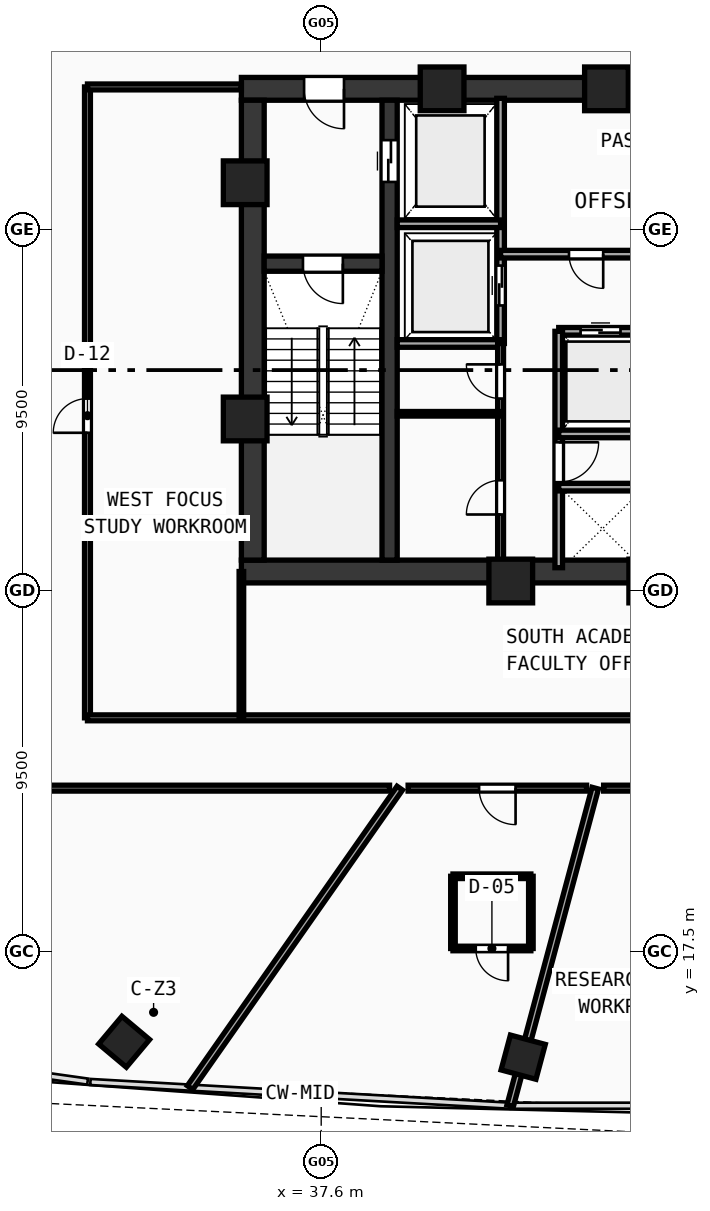
"""IFC4 building model, lengths in metres.
Left out: names, types, materials, properties, quantities, classifications, styles, units other than length and angle.
Written with IfcOpenShell. Run it as: python <this file> out.ifc"""

import sys

from ifc_helpers import new_model, si_unit, direction, frame, frame_2d, origin, origin_with_axes, origin_2d, place, context, subcontext, project, spatial, rectangle, hollow_rectangle, extrude, source, transform, mapped, element, fill, save


model = new_model("IFC4")
c1 = context("Model", 3, precision=1e-05, world=origin(), true_north=direction((0.0, 1.0)))
c2 = subcontext(c1, "Body", "Model", "MODEL_VIEW")
j1 = project(units=[si_unit("LENGTHUNIT", "METRE"), si_unit("PLANEANGLEUNIT", "RADIAN")], contexts=[c1])
p1 = place(None, origin())
s1 = spatial("IfcSite", under=j1, at=p1, CompositionType="ELEMENT")
p2 = place(p1, origin())
s2 = spatial("IfcBuilding", under=s1, at=p2, CompositionType="ELEMENT")
p3 = place(p2, frame((0.0, 0.0, 151.91)))
s3 = spatial("IfcBuildingStorey", under=s2, at=p3, CompositionType="ELEMENT", Elevation=151.91)
p4 = place(p3, frame((35.5, 27.5, 0.0), z_axis=(0.0, 0.0, 1.0), x_axis=(1.0, 0.0, 0.0)))
e1 = element("IfcWall", 1, at=p4, inside=s3, PredefinedType="SHEAR", context=c2, shape_type="SweptSolid", body=[
    extrude(rectangle(XDim=25.0, YDim=0.6, at=frame_2d((12.5, 0.0))), origin(), (0.0, 0.0, 1.0), 3.42),
])
p5 = place(p3, frame((35.5, 40.2, 0.0), z_axis=(0.0, 0.0, 1.0), x_axis=(1.0, 0.0, 0.0)))
e2 = element("IfcWall", 2, at=p5, inside=s3, PredefinedType="SHEAR", context=c2, shape_type="SweptSolid", body=[
    extrude(rectangle(XDim=11.3, YDim=0.6, at=frame_2d((5.65, 0.0))), origin(), (0.0, 0.0, 1.0), 3.42),
])
p6 = place(p5, frame((1.65, 0.0, 0.0)))
e3 = element("IfcOpeningElement", 3, at=p6, cuts=e2, PredefinedType="OPENING", context=c2, shape_type="SweptSolid", body=[
    extrude(rectangle(XDim=1.05, YDim=2.1, at=frame_2d((0.525, 1.05))), frame((0.0, 0.31, 0.0), z_axis=(0.0, -1.0, 0.0), x_axis=(1.0, 0.0, 0.0)), (0.0, 0.0, 1.0), 0.62),
])
p7 = place(p3, frame((35.8, 27.8, 0.0), z_axis=(0.0, 0.0, 1.0), x_axis=(0.0, 1.0, 0.0)))
e4 = element("IfcWall", 4, at=p7, inside=s3, PredefinedType="SHEAR", context=c2, shape_type="SweptSolid", body=[
    extrude(rectangle(XDim=12.1, YDim=0.6, at=frame_2d((6.05, 0.0))), origin(), (0.0, 0.0, 1.0), 3.42),
])
p8 = place(p3, frame((39.4, 27.8, 0.0), z_axis=(0.0, 0.0, 1.0), x_axis=(0.0, 1.0, 0.0)))
e5 = element("IfcWall", 5, at=p8, inside=s3, PredefinedType="SHEAR", context=c2, shape_type="SweptSolid", body=[
    extrude(rectangle(XDim=12.1, YDim=0.4, at=frame_2d((6.05, 0.0))), origin(), (0.0, 0.0, 1.0), 3.42),
])
p9 = place(p8, frame((9.95, 0.0, 0.0)))
e6 = element("IfcOpeningElement", 6, at=p9, cuts=e5, PredefinedType="OPENING", context=c2, shape_type="SweptSolid", body=[
    extrude(rectangle(XDim=1.1, YDim=2.1, at=frame_2d((0.55, 1.05))), frame((0.0, 0.21, 0.0), z_axis=(0.0, -1.0, 0.0), x_axis=(1.0, 0.0, 0.0)), (0.0, 0.0, 1.0), 0.42),
])
p10 = place(p3, frame((36.1, 35.6, 0.0), z_axis=(0.0, 0.0, 1.0), x_axis=(1.0, 0.0, 0.0)))
e7 = element("IfcWall", 7, at=p10, inside=s3, PredefinedType="SHEAR", context=c2, shape_type="SweptSolid", body=[
    extrude(rectangle(XDim=3.1, YDim=0.4, at=frame_2d((1.55, 0.0))), origin(), (0.0, 0.0, 1.0), 3.42),
])
p11 = place(p10, frame((1.02, 0.0, 0.0)))
e8 = element("IfcOpeningElement", 8, at=p11, cuts=e7, PredefinedType="OPENING", context=c2, shape_type="SweptSolid", body=[
    extrude(rectangle(XDim=1.05, YDim=2.1, at=frame_2d((0.525, 1.05))), frame((0.0, 0.21, 0.0), z_axis=(0.0, -1.0, 0.0), x_axis=(1.0, 0.0, 0.0)), (0.0, 0.0, 1.0), 0.42),
])
m1 = source(origin(), c2, "Body", "SweptSolid", [
    extrude(hollow_rectangle(XDim=1.15, YDim=1.15, WallThickness=0.048, at=origin_2d()), origin(), (0.0, 0.0, 1.0), 3.68),
])
for number, where, z_axis, x_axis in (
    (9, (42.588, 27.25, -0.26), (0.0, 0.0, 1.0), (1.0, 0.0, 0.0)),
    (10, (46.272, 27.25, -0.26), (0.0, 0.0, 1.0), (1.0, 0.0, 0.0)),
    (11, (45.106, 40.2, -0.26), (0.0, 0.0, 1.0), (1.0, 0.0, 0.0)),
    (12, (40.781, 40.2, -0.26), (0.0, 0.0, 1.0), (1.0, 0.0, 0.0)),
    (13, (35.6, 37.729, -0.26), (0.0, 0.0, 1.0), (1.0, 0.0, 0.0)),
    (14, (35.6, 31.513, -0.26), (0.0, 0.0, 1.0), (1.0, 0.0, 0.0)),
):
    element("IfcColumn", number, at=place(p3, frame(where, z_axis=z_axis, x_axis=x_axis)), inside=s3, PredefinedType="COLUMN", context=c2, shape_type="MappedRepresentation", body=[
        mapped(m1, transform((0.0, 0.0, 0.0), scale=1.0)),
    ])
m2 = source(origin(), c2, "Body", "SweptSolid", [
    extrude(hollow_rectangle(XDim=0.95, YDim=0.95, WallThickness=0.04, at=origin_2d()), origin(), (0.0, 0.0, 1.0), 3.68),
])
for number, where, z_axis, x_axis in (
    (15, (32.415, 15.126, -0.26), (0.0, 0.0, 1.0), (0.766, -0.643, 0.0)),
    (16, (42.915, 14.722, -0.26), (0.0, 0.0, 1.0), (0.966, -0.259, 0.0)),
):
    element("IfcColumn", number, at=place(p3, frame(where, z_axis=z_axis, x_axis=x_axis)), inside=s3, PredefinedType="COLUMN", context=c2, shape_type="MappedRepresentation", body=[
        mapped(m2, transform((0.0, 0.0, 0.0), scale=1.0)),
    ])
p12 = place(p3, frame((42.32, 33.5, 0.0), z_axis=(0.0, 0.0, 1.0), x_axis=(0.0, 1.0, 0.0)))
e17 = element("IfcWall", 17, at=p12, inside=s3, PredefinedType="SOLIDWALL", context=c2, shape_type="SweptSolid", body=[
    extrude(rectangle(XDim=6.45, YDim=0.2, at=frame_2d((3.225, 0.0))), origin(), (0.0, 0.0, 1.0), 3.42),
])
p13 = place(p12, frame((1.0, 0.0, 0.0)))
e18 = element("IfcOpeningElement", 18, at=p13, cuts=e17, PredefinedType="OPENING", context=c2, shape_type="SweptSolid", body=[
    extrude(rectangle(XDim=1.05, YDim=2.1, at=frame_2d((0.525, 1.05))), frame((0.0, 0.11, 0.0), z_axis=(0.0, -1.0, 0.0), x_axis=(1.0, 0.0, 0.0)), (0.0, 0.0, 1.0), 0.22),
])
for number, where, z_axis, x_axis in (
    (19, (39.6, 36.65, 0.0), (0.0, 0.0, 1.0), (1.0, 0.0, 0.0)),
    (20, (39.6, 33.5, 0.0), (0.0, 0.0, 1.0), (1.0, 0.0, 0.0)),
):
    element("IfcWall", number, at=place(p3, frame(where, z_axis=z_axis, x_axis=x_axis)), inside=s3, PredefinedType="SOLIDWALL", context=c2, shape_type="SweptSolid", body=[
        extrude(rectangle(XDim=2.72, YDim=0.2, at=frame_2d((1.36, 0.0))), origin(), (0.0, 0.0, 1.0), 3.42),
    ])
p14 = place(p3, frame((42.32, 35.85, 0.0), z_axis=(0.0, 0.0, 1.0), x_axis=(1.0, 0.0, 0.0)))
e21 = element("IfcWall", 21, at=p14, inside=s3, PredefinedType="SOLIDWALL", context=c2, shape_type="SweptSolid", body=[
    extrude(rectangle(XDim=4.73, YDim=0.2, at=frame_2d((2.365, 0.0))), origin(), (0.0, 0.0, 1.0), 3.42),
])
p15 = place(p14, frame((1.8, 0.0, 0.0)))
e22 = element("IfcOpeningElement", 22, at=p15, cuts=e21, PredefinedType="OPENING", context=c2, shape_type="SweptSolid", body=[
    extrude(rectangle(XDim=0.9, YDim=2.1, at=frame_2d((0.45, 1.05))), frame((0.0, 0.11, 0.0), z_axis=(0.0, -1.0, 0.0), x_axis=(1.0, 0.0, 0.0)), (0.0, 0.0, 1.0), 0.22),
])
p16 = place(p3, frame((43.85, 33.82, 0.0), z_axis=(0.0, 0.0, 1.0), x_axis=(1.0, 0.0, 0.0)))
e23 = element("IfcWall", 23, at=p16, inside=s3, PredefinedType="SOLIDWALL", context=c2, shape_type="SweptSolid", body=[
    extrude(rectangle(XDim=9.83, YDim=0.2, at=frame_2d((4.915, 0.0))), origin(), (0.0, 0.0, 1.0), 3.42),
])
p17 = place(p16, frame((0.575, 0.0, 0.0)))
e24 = element("IfcOpeningElement", 24, at=p17, cuts=e23, PredefinedType="OPENING", context=c2, shape_type="SweptSolid", body=[
    extrude(rectangle(XDim=1.05, YDim=2.1, at=frame_2d((0.525, 1.05))), frame((0.0, 0.11, 0.0), z_axis=(0.0, -1.0, 0.0), x_axis=(1.0, 0.0, 0.0)), (0.0, 0.0, 1.0), 0.22),
])
p18 = place(p16, frame((2.875, 0.0, 0.0)))
e25 = element("IfcOpeningElement", 25, at=p18, cuts=e23, PredefinedType="OPENING", context=c2, shape_type="SweptSolid", body=[
    extrude(rectangle(XDim=1.05, YDim=2.1, at=frame_2d((0.525, 1.05))), frame((0.0, 0.11, 0.0), z_axis=(0.0, -1.0, 0.0), x_axis=(1.0, 0.0, 0.0)), (0.0, 0.0, 1.0), 0.22),
])
p19 = place(p16, frame((5.175, 0.0, 0.0)))
e26 = element("IfcOpeningElement", 26, at=p19, cuts=e23, PredefinedType="OPENING", context=c2, shape_type="SweptSolid", body=[
    extrude(rectangle(XDim=1.05, YDim=2.1, at=frame_2d((0.525, 1.05))), frame((0.0, 0.11, 0.0), z_axis=(0.0, -1.0, 0.0), x_axis=(1.0, 0.0, 0.0)), (0.0, 0.0, 1.0), 0.22),
])
p20 = place(p16, frame((7.475, 0.0, 0.0)))
e27 = element("IfcOpeningElement", 27, at=p20, cuts=e23, PredefinedType="OPENING", context=c2, shape_type="SweptSolid", body=[
    extrude(rectangle(XDim=1.05, YDim=2.1, at=frame_2d((0.525, 1.05))), frame((0.0, 0.11, 0.0), z_axis=(0.0, -1.0, 0.0), x_axis=(1.0, 0.0, 0.0)), (0.0, 0.0, 1.0), 0.22),
])
p21 = place(p3, frame((43.85, 27.6, 0.0), z_axis=(0.0, 0.0, 1.0), x_axis=(0.0, 1.0, 0.0)))
e28 = element("IfcWall", 28, at=p21, inside=s3, PredefinedType="SOLIDWALL", context=c2, shape_type="SweptSolid", body=[
    extrude(rectangle(XDim=6.22, YDim=0.2, at=frame_2d((3.11, 0.0))), origin(), (0.0, 0.0, 1.0), 3.42),
])
p22 = place(p21, frame((2.25, 0.0, 0.0)))
e29 = element("IfcOpeningElement", 29, at=p22, cuts=e28, PredefinedType="OPENING", context=c2, shape_type="SweptSolid", body=[
    extrude(rectangle(XDim=1.05, YDim=2.1, at=frame_2d((0.525, 1.05))), frame((0.0, 0.11, 0.0), z_axis=(0.0, -1.0, 0.0), x_axis=(1.0, 0.0, 0.0)), (0.0, 0.0, 1.0), 0.22),
])
p23 = place(p3, frame((43.85, 29.72, 0.0), z_axis=(0.0, 0.0, 1.0), x_axis=(1.0, 0.0, 0.0)))
e30 = element("IfcWall", 30, at=p23, inside=s3, PredefinedType="SOLIDWALL", context=c2, shape_type="SweptSolid", body=[
    extrude(rectangle(XDim=7.2, YDim=0.2, at=frame_2d((3.6, 0.0))), origin(), (0.0, 0.0, 1.0), 3.42),
])
p24 = place(p3, frame((43.85, 31.12, 0.0), z_axis=(0.0, 0.0, 1.0), x_axis=(1.0, 0.0, 0.0)))
e31 = element("IfcWall", 31, at=p24, inside=s3, PredefinedType="SOLIDWALL", context=c2, shape_type="SweptSolid", body=[
    extrude(rectangle(XDim=9.83, YDim=0.2, at=frame_2d((4.915, 0.0))), origin(), (0.0, 0.0, 1.0), 3.42),
])
p25 = place(p3, frame((42.32, 27.6, 0.0), z_axis=(0.0, 0.0, 1.0), x_axis=(0.0, 1.0, 0.0)))
e32 = element("IfcWall", 32, at=p25, inside=s3, PredefinedType="PARTITIONING", context=c2, shape_type="SweptSolid", body=[
    extrude(rectangle(XDim=5.9, YDim=0.155, at=frame_2d((2.95, 0.0))), origin(), (0.0, 0.0, 1.0), 3.42),
])
p26 = place(p25, frame((1.4, 0.0, 0.0)))
e33 = element("IfcOpeningElement", 33, at=p26, cuts=e32, PredefinedType="OPENING", context=c2, shape_type="SweptSolid", body=[
    extrude(rectangle(XDim=0.9, YDim=2.1, at=frame_2d((0.45, 1.05))), frame((0.0, 0.087, 0.0), z_axis=(0.0, -1.0, 0.0), x_axis=(1.0, 0.0, 0.0)), (0.0, 0.0, 1.0), 0.175),
])
p27 = place(p25, frame((4.45, 0.0, 0.0)))
e34 = element("IfcOpeningElement", 34, at=p27, cuts=e32, PredefinedType="OPENING", context=c2, shape_type="SweptSolid", body=[
    extrude(rectangle(XDim=0.9, YDim=2.1, at=frame_2d((0.45, 1.05))), frame((0.0, 0.087, 0.0), z_axis=(0.0, -1.0, 0.0), x_axis=(1.0, 0.0, 0.0)), (0.0, 0.0, 1.0), 0.175),
])
p28 = place(p3, frame((39.6, 31.65, 0.0), z_axis=(0.0, 0.0, 1.0), x_axis=(1.0, 0.0, 0.0)))
e35 = element("IfcWall", 35, at=p28, inside=s3, PredefinedType="PARTITIONING", context=c2, shape_type="SweptSolid", body=[
    extrude(rectangle(XDim=2.72, YDim=0.12, at=frame_2d((1.36, 0.0))), origin(), (0.0, 0.0, 1.0), 3.42),
])
p29 = place(p3, frame((31.45, 23.65, 0.0), z_axis=(0.0, 0.0, 1.0), x_axis=(0.0, 1.0, 0.0)))
e36 = element("IfcWall", 36, at=p29, inside=s3, PredefinedType="PARTITIONING", context=c2, shape_type="SweptSolid", body=[
    extrude(rectangle(XDim=16.6, YDim=0.155, at=frame_2d((8.3, 0.0))), origin(), (0.0, 0.0, 1.0), 2.77),
])
p30 = place(p29, frame((7.5, 0.0, 0.0)))
e37 = element("IfcOpeningElement", 37, at=p30, cuts=e36, PredefinedType="OPENING", context=c2, shape_type="SweptSolid", body=[
    extrude(rectangle(XDim=0.9, YDim=2.08, at=frame_2d((0.45, 1.04))), frame((0.0, 0.087, 0.0), z_axis=(0.0, -1.0, 0.0), x_axis=(1.0, 0.0, 0.0)), (0.0, 0.0, 1.0), 0.175),
])
p31 = place(p3, frame((31.45, 23.65, 0.0), z_axis=(0.0, 0.0, 1.0), x_axis=(1.0, 0.0, 0.0)))
e38 = element("IfcWall", 38, at=p31, inside=s3, PredefinedType="PARTITIONING", context=c2, shape_type="SweptSolid", body=[
    extrude(rectangle(XDim=33.1, YDim=0.155, at=frame_2d((16.55, 0.0))), origin(), (0.0, 0.0, 1.0), 2.77),
])
p32 = place(p31, frame((16.0, 0.0, 0.0)))
e39 = element("IfcOpeningElement", 39, at=p32, cuts=e38, PredefinedType="OPENING", context=c2, shape_type="SweptSolid", body=[
    extrude(rectangle(XDim=0.92, YDim=2.1, at=frame_2d((0.46, 1.05))), frame((0.0, 0.087, 0.0), z_axis=(0.0, -1.0, 0.0), x_axis=(1.0, 0.0, 0.0)), (0.0, 0.0, 1.0), 0.175),
])
p33 = place(p3, frame((31.45, 40.25, 0.0), z_axis=(0.0, 0.0, 1.0), x_axis=(1.0, 0.0, 0.0)))
e40 = element("IfcWall", 40, at=p33, inside=s3, PredefinedType="PARTITIONING", context=c2, shape_type="SweptSolid", body=[
    extrude(rectangle(XDim=4.05, YDim=0.155, at=frame_2d((2.025, 0.0))), origin(), (0.0, 0.0, 1.0), 3.42),
])
p34 = place(p3, frame((35.5, 23.65, 0.0), z_axis=(0.0, 0.0, 1.0), x_axis=(0.0, 1.0, 0.0)))
e41 = element("IfcWall", 41, at=p34, inside=s3, PredefinedType="PARTITIONING", context=c2, shape_type="SweptSolid", body=[
    extrude(rectangle(XDim=3.85, YDim=0.12, at=frame_2d((1.925, 0.0))), origin(), (0.0, 0.0, 1.0), 3.02),
])
p35 = place(p3, frame((39.667, 21.8, 0.0), z_axis=(0.0, 0.0, 1.0), x_axis=(-0.573578164834, -0.81915083399, 0.0)))
e42 = element("IfcWall", 42, at=p35, inside=s3, PredefinedType="PARTITIONING", context=c2, shape_type="SweptSolid", body=[
    extrude(rectangle(XDim=9.62, YDim=0.175, at=frame_2d((4.81, 0.0))), origin(), (0.0, 0.0, 1.0), 2.77),
])
p36 = place(p3, frame((44.811, 21.8, 0.0), z_axis=(0.0, 0.0, 1.0), x_axis=(-0.258790159725, -0.96593356564, 0.0)))
e43 = element("IfcWall", 43, at=p36, inside=s3, PredefinedType="PARTITIONING", context=c2, shape_type="SweptSolid", body=[
    extrude(rectangle(XDim=8.651, YDim=0.175, at=frame_2d((4.325, 0.0))), origin(), (0.0, 0.0, 1.0), 2.77),
])
p37 = place(p3, frame((48.196, 21.8, 0.0), z_axis=(0.0, 0.0, 1.0), x_axis=(-1.0, 0.0, 0.0)))
e44 = element("IfcWall", 44, at=p37, inside=s3, PredefinedType="PARTITIONING", context=c2, shape_type="SweptSolid", body=[
    extrude(rectangle(XDim=3.165, YDim=0.155, at=frame_2d((1.582, 0.0))), origin(), (0.0, 0.0, 1.0), 3.42),
])
p38 = place(p37, frame((1.122, 0.0, 0.0)))
e45 = element("IfcOpeningElement", 45, at=p38, cuts=e44, PredefinedType="OPENING", context=c2, shape_type="SweptSolid", body=[
    extrude(rectangle(XDim=0.92, YDim=2.1, at=frame_2d((0.46, 1.05))), frame((0.0, 0.087, 0.0), z_axis=(0.0, -1.0, 0.0), x_axis=(1.0, 0.0, 0.0)), (0.0, 0.0, 1.0), 0.175),
])
p39 = place(p3, frame((44.583, 21.8, 0.0), z_axis=(0.0, 0.0, 1.0), x_axis=(-1.0, 0.0, 0.0)))
e46 = element("IfcWall", 46, at=p39, inside=s3, PredefinedType="PARTITIONING", context=c2, shape_type="SweptSolid", body=[
    extrude(rectangle(XDim=4.696, YDim=0.155, at=frame_2d((2.348, 0.0))), origin(), (0.0, 0.0, 1.0), 3.42),
])
p40 = place(p39, frame((1.869, 0.0, 0.0)))
e47 = element("IfcOpeningElement", 47, at=p40, cuts=e46, PredefinedType="OPENING", context=c2, shape_type="SweptSolid", body=[
    extrude(rectangle(XDim=0.96, YDim=2.12, at=frame_2d((0.48, 1.06))), frame((0.0, 0.087, 0.0), z_axis=(0.0, -1.0, 0.0), x_axis=(1.0, 0.0, 0.0)), (0.0, 0.0, 1.0), 0.175),
])
p41 = place(p3, frame((39.399, 21.8, 0.0), z_axis=(0.0, 0.0, 1.0), x_axis=(-1.0, 0.0, 0.0)))
e48 = element("IfcWall", 48, at=p41, inside=s3, PredefinedType="PARTITIONING", context=c2, shape_type="SweptSolid", body=[
    extrude(rectangle(XDim=9.799, YDim=0.155, at=frame_2d((4.899, 0.0))), origin(), (0.0, 0.0, 1.0), 2.77),
])
p42 = place(p3, frame((41.067, 17.581, 0.0), z_axis=(0.0, 0.0, 1.0), x_axis=(1.0, 0.0, 0.0)))
e49 = element("IfcWall", 49, at=p42, inside=s3, PredefinedType="PARTITIONING", context=c2, shape_type="SweptSolid", body=[
    extrude(rectangle(XDim=2.05, YDim=0.12, at=frame_2d((1.025, 0.0))), origin(), (0.0, 0.0, 1.0), 3.42),
])
p43 = place(p42, frame((0.6, 0.0, 0.0)))
e50 = element("IfcOpeningElement", 50, at=p43, cuts=e49, PredefinedType="OPENING", context=c2, shape_type="SweptSolid", body=[
    extrude(rectangle(XDim=0.85, YDim=2.1, at=frame_2d((0.425, 1.05))), frame((0.0, 0.07, 0.0), z_axis=(0.0, -1.0, 0.0), x_axis=(1.0, 0.0, 0.0)), (0.0, 0.0, 1.0), 0.14),
])
p44 = place(p3, frame((43.117, 17.581, 0.0), z_axis=(0.0, 0.0, 1.0), x_axis=(0.0, 1.0, 0.0)))
e51 = element("IfcWall", 51, at=p44, inside=s3, PredefinedType="PARTITIONING", context=c2, shape_type="SweptSolid", body=[
    extrude(rectangle(XDim=1.9, YDim=0.12, at=frame_2d((0.95, 0.0))), origin(), (0.0, 0.0, 1.0), 3.02),
])
p45 = place(p3, frame((43.117, 19.481, 0.0), z_axis=(0.0, 0.0, 1.0), x_axis=(-1.0, 0.0, 0.0)))
e52 = element("IfcWall", 52, at=p45, inside=s3, PredefinedType="PARTITIONING", context=c2, shape_type="SweptSolid", body=[
    extrude(rectangle(XDim=2.05, YDim=0.12, at=frame_2d((1.025, 0.0))), origin(), (0.0, 0.0, 1.0), 3.42),
])
p46 = place(p3, frame((41.067, 19.481, 0.0), z_axis=(0.0, 0.0, 1.0), x_axis=(0.0, -1.0, 0.0)))
e53 = element("IfcWall", 53, at=p46, inside=s3, PredefinedType="PARTITIONING", context=c2, shape_type="SweptSolid", body=[
    extrude(rectangle(XDim=1.9, YDim=0.12, at=frame_2d((0.95, 0.0))), origin(), (0.0, 0.0, 1.0), 3.02),
])
m3 = source(origin(), c2, "Body", "SweptSolid", [
    extrude(rectangle(XDim=1.05, YDim=2.1, at=frame_2d((0.525, 1.05))), frame((0.0, 0.025, 0.0), z_axis=(0.0, -1.0, 0.0), x_axis=(1.0, 0.0, 0.0)), (0.0, 0.0, 1.0), 0.05),
])
p47 = place(p11, frame((1.05, 0.0, 0.0), z_axis=(0.0, 0.0, 1.0), x_axis=(-1.0, 0.0, 0.0)))
e54 = element("IfcDoor", 54, at=p47, inside=s3, OperationType="SINGLE_SWING_LEFT", PredefinedType="DOOR", context=c2, shape_type="MappedRepresentation", body=[
    mapped(m3, transform((0.0, 0.0, 0.0), scale=1.0)),
])
fill(e8, e54)
p48 = place(p6, frame((1.05, 0.0, 0.0), z_axis=(0.0, 0.0, 1.0), x_axis=(-1.0, 0.0, 0.0)))
e55 = element("IfcDoor", 55, at=p48, inside=s3, OperationType="SINGLE_SWING_LEFT", PredefinedType="DOOR", context=c2, shape_type="MappedRepresentation", body=[
    mapped(m3, transform((0.0, 0.0, 0.0), scale=1.0)),
])
fill(e3, e55)
m4 = source(origin(), c2, "Body", "SweptSolid", [
    extrude(rectangle(XDim=1.1, YDim=2.1, at=frame_2d((0.55, 1.05))), frame((0.0, 0.025, 0.0), z_axis=(0.0, -1.0, 0.0), x_axis=(1.0, 0.0, 0.0)), (0.0, 0.0, 1.0), 0.05),
])
p49 = place(p9, frame((1.1, 0.0, 0.0), z_axis=(0.0, 0.0, 1.0), x_axis=(-1.0, 0.0, 0.0)))
e56 = element("IfcDoor", 56, at=p49, inside=s3, OperationType="DOUBLE_DOOR_SLIDING", PredefinedType="DOOR", context=c2, shape_type="MappedRepresentation", body=[
    mapped(m4, transform((0.0, 0.0, 0.0), scale=1.0)),
])
fill(e6, e56)
p50 = place(p13, origin_with_axes())
e57 = element("IfcDoor", 57, at=p50, inside=s3, OperationType="DOUBLE_DOOR_SLIDING", PredefinedType="DOOR", context=c2, shape_type="MappedRepresentation", body=[
    mapped(m3, transform((0.0, 0.0, 0.0), scale=1.0)),
])
fill(e18, e57)
m5 = source(origin(), c2, "Body", "SweptSolid", [
    extrude(rectangle(XDim=0.9, YDim=2.1, at=frame_2d((0.45, 1.05))), frame((0.0, 0.025, 0.0), z_axis=(0.0, -1.0, 0.0), x_axis=(1.0, 0.0, 0.0)), (0.0, 0.0, 1.0), 0.05),
])
p51 = place(p15, frame((0.9, 0.0, 0.0), z_axis=(0.0, 0.0, 1.0), x_axis=(-1.0, 0.0, 0.0)))
e58 = element("IfcDoor", 58, at=p51, inside=s3, OperationType="SINGLE_SWING_LEFT", PredefinedType="DOOR", context=c2, shape_type="MappedRepresentation", body=[
    mapped(m5, transform((0.0, 0.0, 0.0), scale=1.0)),
])
fill(e22, e58)
p52 = place(p17, origin_with_axes())
e59 = element("IfcDoor", 59, at=p52, inside=s3, OperationType="DOUBLE_DOOR_SLIDING", PredefinedType="DOOR", context=c2, shape_type="MappedRepresentation", body=[
    mapped(m3, transform((0.0, 0.0, 0.0), scale=1.0)),
])
fill(e24, e59)
p53 = place(p22, frame((1.05, 0.0, 0.0), z_axis=(0.0, 0.0, 1.0), x_axis=(-1.0, 0.0, 0.0)))
e60 = element("IfcDoor", 60, at=p53, inside=s3, OperationType="SINGLE_SWING_LEFT", PredefinedType="DOOR", context=c2, shape_type="MappedRepresentation", body=[
    mapped(m3, transform((0.0, 0.0, 0.0), scale=1.0)),
])
fill(e29, e60)
p54 = place(p26, origin_with_axes())
e61 = element("IfcDoor", 61, at=p54, inside=s3, OperationType="SINGLE_SWING_LEFT", PredefinedType="DOOR", context=c2, shape_type="MappedRepresentation", body=[
    mapped(m5, transform((0.0, 0.0, 0.0), scale=1.0)),
])
fill(e33, e61)
p55 = place(p27, origin_with_axes())
e62 = element("IfcDoor", 62, at=p55, inside=s3, OperationType="SINGLE_SWING_RIGHT", PredefinedType="DOOR", context=c2, shape_type="MappedRepresentation", body=[
    mapped(m5, transform((0.0, 0.0, 0.0), scale=1.0)),
])
fill(e34, e62)
m6 = source(origin(), c2, "Body", "SweptSolid", [
    extrude(rectangle(XDim=0.9, YDim=2.08, at=frame_2d((0.45, 1.04))), frame((0.0, 0.025, 0.0), z_axis=(0.0, -1.0, 0.0), x_axis=(1.0, 0.0, 0.0)), (0.0, 0.0, 1.0), 0.05),
])
p56 = place(p30, origin_with_axes())
e63 = element("IfcDoor", 63, at=p56, inside=s3, OperationType="SINGLE_SWING_LEFT", PredefinedType="DOOR", context=c2, shape_type="MappedRepresentation", body=[
    mapped(m6, transform((0.0, 0.0, 0.0), scale=1.0)),
])
fill(e37, e63)
m7 = source(origin(), c2, "Body", "SweptSolid", [
    extrude(rectangle(XDim=0.96, YDim=2.12, at=frame_2d((0.48, 1.06))), frame((0.0, 0.025, 0.0), z_axis=(0.0, -1.0, 0.0), x_axis=(1.0, 0.0, 0.0)), (0.0, 0.0, 1.0), 0.05),
])
p57 = place(p40, origin_with_axes())
e64 = element("IfcDoor", 64, at=p57, inside=s3, OperationType="SINGLE_SWING_LEFT", PredefinedType="DOOR", context=c2, shape_type="MappedRepresentation", body=[
    mapped(m7, transform((0.0, 0.0, 0.0), scale=1.0)),
])
fill(e47, e64)
m8 = source(origin(), c2, "Body", "SweptSolid", [
    extrude(rectangle(XDim=0.85, YDim=2.1, at=frame_2d((0.425, 1.05))), frame((0.0, 0.025, 0.0), z_axis=(0.0, -1.0, 0.0), x_axis=(1.0, 0.0, 0.0)), (0.0, 0.0, 1.0), 0.05),
])
p58 = place(p43, frame((0.85, 0.0, 0.0), z_axis=(0.0, 0.0, 1.0), x_axis=(-1.0, 0.0, 0.0)))
e65 = element("IfcDoor", 65, at=p58, inside=s3, OperationType="SINGLE_SWING_LEFT", PredefinedType="DOOR", context=c2, shape_type="MappedRepresentation", body=[
    mapped(m8, transform((0.0, 0.0, 0.0), scale=1.0)),
])
fill(e50, e65)
save(model, sys.argv[1])
